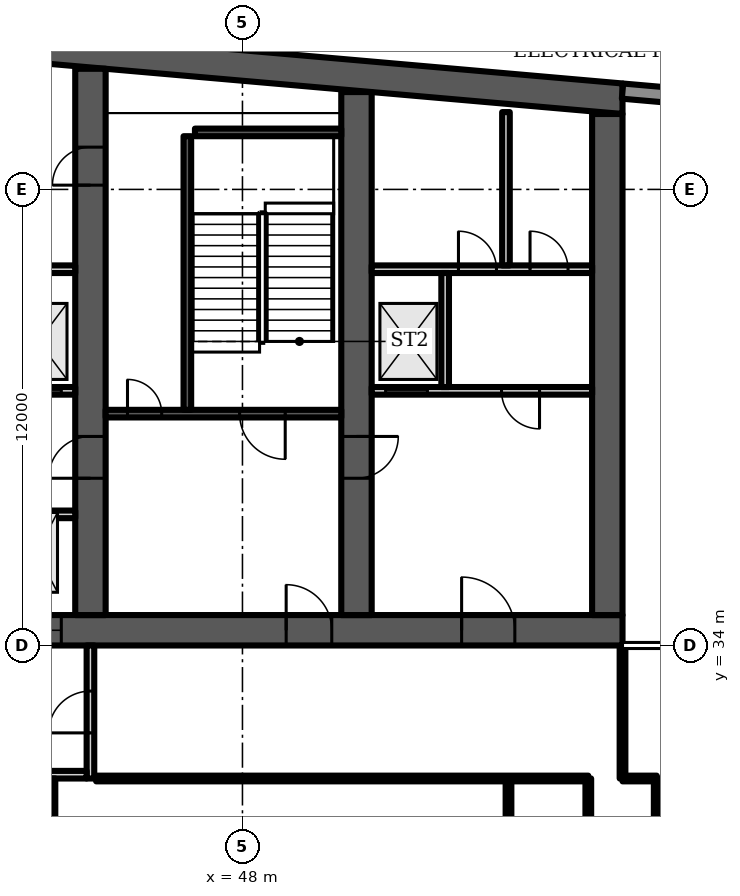
"""IFC4 building model, lengths in metres.
Left out: names, types, materials, properties, quantities, classifications, styles, units other than length and angle.
Written with IfcOpenShell. Run it as: python <this file> out.ifc"""

import sys

from ifc_helpers import new_model, si_unit, direction, frame, frame_2d, origin, place, context, subcontext, project, spatial, polyline, rectangle, outline, extrude, element, fill, save


model = new_model("IFC4")
c1 = context("Model", 3, precision=1e-05, world=origin(), true_north=direction((0.0, 1.0)))
c2 = subcontext(c1, "Body", "Model", "MODEL_VIEW")
j1 = project(units=[si_unit("LENGTHUNIT", "METRE"), si_unit("PLANEANGLEUNIT", "RADIAN")], contexts=[c1])
p1 = place(None, origin())
s1 = spatial("IfcSite", under=j1, at=p1, CompositionType="ELEMENT")
p2 = place(p1, origin())
s2 = spatial("IfcBuilding", under=s1, at=p2, CompositionType="ELEMENT")
p3 = place(p2, frame((0.0, 0.0, 202.3)))
s3 = spatial("IfcBuildingStorey", under=s2, at=p3, CompositionType="ELEMENT", Elevation=202.3)
p4 = place(p3, origin())
e1 = element("IfcWall", 1, at=p4, inside=s3, PredefinedType="SHEAR", context=c2, shape_type="SweptSolid", body=[
    extrude(outline(polyline([(16.0, 47.984), (37.0, 49.822), (58.0, 47.984), (58.0, 48.787), (37.0, 50.625), (16.0, 48.787), (16.0, 47.984)])), origin(), (0.0, 0.0, 1.0), 4.8),
])
p5 = place(p3, frame((16.0, 34.4, 0.0), z_axis=(0.0, 0.0, 1.0), x_axis=(1.0, 0.0, 0.0)))
e2 = element("IfcWall", 2, at=p5, inside=s3, PredefinedType="SHEAR", context=c2, shape_type="SweptSolid", body=[
    extrude(rectangle(XDim=42.0, YDim=0.8, at=frame_2d((21.0, 0.0))), origin(), (0.0, 0.0, 1.0), 4.8),
])
p6 = place(p5, frame((3.2, 0.0, 0.0)))
e3 = element("IfcOpeningElement", 3, at=p6, cuts=e2, PredefinedType="OPENING", context=c2, shape_type="SweptSolid", body=[
    extrude(rectangle(XDim=1.0, YDim=2.1, at=frame_2d((0.5, 1.05))), frame((0.0, 0.41, 0.0), z_axis=(0.0, -1.0, 0.0), x_axis=(1.0, 0.0, 0.0)), (0.0, 0.0, 1.0), 0.82),
])
p7 = place(p5, frame((7.65, 0.0, 0.0)))
e4 = element("IfcOpeningElement", 4, at=p7, cuts=e2, PredefinedType="OPENING", context=c2, shape_type="SweptSolid", body=[
    extrude(rectangle(XDim=1.2, YDim=2.1, at=frame_2d((0.6, 1.05))), frame((0.0, 0.41, 0.0), z_axis=(0.0, -1.0, 0.0), x_axis=(1.0, 0.0, 0.0)), (0.0, 0.0, 1.0), 0.82),
])
p8 = place(p5, frame((14.767, 0.0, 0.0)))
e5 = element("IfcOpeningElement", 5, at=p8, cuts=e2, PredefinedType="OPENING", context=c2, shape_type="SweptSolid", body=[
    extrude(rectangle(XDim=1.1, YDim=2.1, at=frame_2d((0.55, 1.05))), frame((0.0, 0.41, 0.0), z_axis=(0.0, -1.0, 0.0), x_axis=(1.0, 0.0, 0.0)), (0.0, 0.0, 1.0), 0.82),
])
p9 = place(p5, frame((19.133, 0.0, 0.0)))
e6 = element("IfcOpeningElement", 6, at=p9, cuts=e2, PredefinedType="OPENING", context=c2, shape_type="SweptSolid", body=[
    extrude(rectangle(XDim=1.1, YDim=2.1, at=frame_2d((0.55, 1.05))), frame((0.0, 0.41, 0.0), z_axis=(0.0, -1.0, 0.0), x_axis=(1.0, 0.0, 0.0)), (0.0, 0.0, 1.0), 0.82),
])
p10 = place(p5, frame((16.8, 0.0, 0.0)))
e7 = element("IfcOpeningElement", 7, at=p10, cuts=e2, PredefinedType="OPENING", context=c2, shape_type="SweptSolid", body=[
    extrude(rectangle(XDim=1.4, YDim=2.1, at=frame_2d((0.7, 1.05))), frame((0.0, 0.41, 0.0), z_axis=(0.0, -1.0, 0.0), x_axis=(1.0, 0.0, 0.0)), (0.0, 0.0, 1.0), 0.82),
])
p11 = place(p5, frame((21.767, 0.0, 0.0)))
e8 = element("IfcOpeningElement", 8, at=p11, cuts=e2, PredefinedType="OPENING", context=c2, shape_type="SweptSolid", body=[
    extrude(rectangle(XDim=1.1, YDim=2.1, at=frame_2d((0.55, 1.05))), frame((0.0, 0.41, 0.0), z_axis=(0.0, -1.0, 0.0), x_axis=(1.0, 0.0, 0.0)), (0.0, 0.0, 1.0), 0.82),
])
p12 = place(p5, frame((23.95, 0.0, 0.0)))
e9 = element("IfcOpeningElement", 9, at=p12, cuts=e2, PredefinedType="OPENING", context=c2, shape_type="SweptSolid", body=[
    extrude(rectangle(XDim=1.1, YDim=2.1, at=frame_2d((0.55, 1.05))), frame((0.0, 0.41, 0.0), z_axis=(0.0, -1.0, 0.0), x_axis=(1.0, 0.0, 0.0)), (0.0, 0.0, 1.0), 0.82),
])
p13 = place(p5, frame((26.133, 0.0, 0.0)))
e10 = element("IfcOpeningElement", 10, at=p13, cuts=e2, PredefinedType="OPENING", context=c2, shape_type="SweptSolid", body=[
    extrude(rectangle(XDim=1.1, YDim=2.1, at=frame_2d((0.55, 1.05))), frame((0.0, 0.41, 0.0), z_axis=(0.0, -1.0, 0.0), x_axis=(1.0, 0.0, 0.0)), (0.0, 0.0, 1.0), 0.82),
])
p14 = place(p5, frame((33.15, 0.0, 0.0)))
e11 = element("IfcOpeningElement", 11, at=p14, cuts=e2, PredefinedType="OPENING", context=c2, shape_type="SweptSolid", body=[
    extrude(rectangle(XDim=1.2, YDim=2.1, at=frame_2d((0.6, 1.05))), frame((0.0, 0.41, 0.0), z_axis=(0.0, -1.0, 0.0), x_axis=(1.0, 0.0, 0.0)), (0.0, 0.0, 1.0), 0.82),
])
p15 = place(p5, frame((37.767, 0.0, 0.0)))
e12 = element("IfcOpeningElement", 12, at=p15, cuts=e2, PredefinedType="OPENING", context=c2, shape_type="SweptSolid", body=[
    extrude(rectangle(XDim=1.4, YDim=2.1, at=frame_2d((0.7, 1.05))), frame((0.0, 0.41, 0.0), z_axis=(0.0, -1.0, 0.0), x_axis=(1.0, 0.0, 0.0)), (0.0, 0.0, 1.0), 0.82),
])
p16 = place(p3, frame((44.0, 34.8, 0.0), z_axis=(0.0, 0.0, 1.0), x_axis=(0.0, 1.0, 0.0)))
e13 = element("IfcWall", 13, at=p16, inside=s3, PredefinedType="SHEAR", context=c2, shape_type="SweptSolid", body=[
    extrude(rectangle(XDim=14.374, YDim=0.8, at=frame_2d((7.187, 0.0))), origin(), (0.0, 0.0, 1.0), 4.8),
])
p17 = place(p16, frame((11.312, 0.0, 0.0)))
e14 = element("IfcOpeningElement", 14, at=p17, cuts=e13, PredefinedType="OPENING", context=c2, shape_type="SweptSolid", body=[
    extrude(rectangle(XDim=1.0, YDim=2.1, at=frame_2d((0.5, 1.05))), frame((0.0, 0.41, 0.0), z_axis=(0.0, -1.0, 0.0), x_axis=(1.0, 0.0, 0.0)), (0.0, 0.0, 1.0), 0.82),
])
p18 = place(p16, frame((3.6, 0.0, 0.0)))
e15 = element("IfcOpeningElement", 15, at=p18, cuts=e13, PredefinedType="OPENING", context=c2, shape_type="SweptSolid", body=[
    extrude(rectangle(XDim=1.1, YDim=2.1, at=frame_2d((0.55, 1.05))), frame((0.0, 0.41, 0.0), z_axis=(0.0, -1.0, 0.0), x_axis=(1.0, 0.0, 0.0)), (0.0, 0.0, 1.0), 0.82),
])
p19 = place(p3, frame((51.0, 34.8, 0.0), z_axis=(0.0, 0.0, 1.0), x_axis=(0.0, 1.0, 0.0)))
e16 = element("IfcWall", 16, at=p19, inside=s3, PredefinedType="SHEAR", context=c2, shape_type="SweptSolid", body=[
    extrude(rectangle(XDim=13.762, YDim=0.8, at=frame_2d((6.881, 0.0))), origin(), (0.0, 0.0, 1.0), 4.8),
])
p20 = place(p19, frame((3.6, 0.0, 0.0)))
e17 = element("IfcOpeningElement", 17, at=p20, cuts=e16, PredefinedType="OPENING", context=c2, shape_type="SweptSolid", body=[
    extrude(rectangle(XDim=1.1, YDim=2.1, at=frame_2d((0.55, 1.05))), frame((0.0, 0.41, 0.0), z_axis=(0.0, -1.0, 0.0), x_axis=(1.0, 0.0, 0.0)), (0.0, 0.0, 1.0), 0.82),
])
p21 = place(p3, frame((57.6, 34.8, 0.0), z_axis=(0.0, 0.0, 1.0), x_axis=(0.0, 1.0, 0.0)))
e18 = element("IfcWall", 18, at=p21, inside=s3, PredefinedType="SHEAR", context=c2, shape_type="SweptSolid", body=[
    extrude(rectangle(XDim=13.184, YDim=0.8, at=frame_2d((6.592, 0.0))), origin(), (0.0, 0.0, 1.0), 4.8),
])
p22 = place(p3, frame((60.983, 48.326, 0.0), z_axis=(0.0, 0.0, 1.0), x_axis=(-0.996194, 0.087168, 0.0)))
e19 = element("IfcWall", 19, at=p22, inside=s3, PredefinedType="SOLIDWALL", context=c2, shape_type="SweptSolid", body=[
    extrude(rectangle(XDim=2.994, YDim=0.4, at=frame_2d((1.497, 0.0))), origin(), (0.0, 0.0, 1.0), 4.4),
])
p23 = place(p3, frame((37.4, 40.7, 0.0), z_axis=(0.0, 0.0, 1.0), x_axis=(1.0, 0.0, 0.0)))
e20 = element("IfcWall", 20, at=p23, inside=s3, PredefinedType="PARTITIONING", context=c2, shape_type="SweptSolid", body=[
    extrude(rectangle(XDim=6.2, YDim=0.2, at=frame_2d((3.1, 0.0))), origin(), (0.0, 0.0, 1.0), 4.4),
])
p24 = place(p23, frame((0.367, 0.0, 0.0)))
e21 = element("IfcOpeningElement", 21, at=p24, cuts=e20, PredefinedType="OPENING", context=c2, shape_type="SweptSolid", body=[
    extrude(rectangle(XDim=1.1, YDim=2.1, at=frame_2d((0.55, 1.05))), frame((0.0, 0.11, 0.0), z_axis=(0.0, -1.0, 0.0), x_axis=(1.0, 0.0, 0.0)), (0.0, 0.0, 1.0), 0.22),
])
p25 = place(p23, frame((2.55, 0.0, 0.0)))
e22 = element("IfcOpeningElement", 22, at=p25, cuts=e20, PredefinedType="OPENING", context=c2, shape_type="SweptSolid", body=[
    extrude(rectangle(XDim=1.1, YDim=2.1, at=frame_2d((0.55, 1.05))), frame((0.0, 0.11, 0.0), z_axis=(0.0, -1.0, 0.0), x_axis=(1.0, 0.0, 0.0)), (0.0, 0.0, 1.0), 0.22),
])
p26 = place(p23, frame((4.733, 0.0, 0.0)))
e23 = element("IfcOpeningElement", 23, at=p26, cuts=e20, PredefinedType="OPENING", context=c2, shape_type="SweptSolid", body=[
    extrude(rectangle(XDim=1.1, YDim=2.1, at=frame_2d((0.55, 1.05))), frame((0.0, 0.11, 0.0), z_axis=(0.0, -1.0, 0.0), x_axis=(1.0, 0.0, 0.0)), (0.0, 0.0, 1.0), 0.22),
])
p27 = place(p3, frame((0.0, 0.0, -0.0)))
e24 = element("IfcWall", 24, at=p27, inside=s3, PredefinedType="PARTITIONING", context=c2, shape_type="SweptSolid", body=[
    extrude(outline(polyline([(41.567, 37.1), (39.433, 37.1), (39.433, 34.8), (39.233, 34.8), (39.233, 37.65), (37.4, 37.65), (37.4, 37.85), (39.233, 37.85), (39.433, 37.85), (39.433, 37.3), (41.567, 37.3), (41.567, 37.55), (41.767, 37.55), (43.6, 37.55), (43.6, 37.35), (41.767, 37.35), (41.767, 34.8), (41.567, 34.8), (41.567, 37.1)])), origin(), (0.0, 0.0, 1.0), 4.4),
])
p28 = place(p3, frame((0.0, 0.0, -0.0)))
e25 = element("IfcWall", 25, at=p28, inside=s3, PredefinedType="PARTITIONING", context=c2, shape_type="SweptSolid", body=[
    extrude(outline(polyline([(39.433, 40.8), (39.233, 40.8), (39.233, 43.8), (37.4, 43.8), (37.4, 44.0), (43.6, 44.0), (43.6, 43.8), (41.767, 43.8), (41.767, 40.8), (41.567, 40.8), (41.567, 43.8), (39.433, 43.8), (39.433, 40.8)])), origin(), (0.0, 0.0, 1.0), 4.4),
])
p29 = place(p3, frame((44.4, 40.1, 0.0), z_axis=(0.0, 0.0, 1.0), x_axis=(1.0, 0.0, 0.0)))
e26 = element("IfcWall", 26, at=p29, inside=s3, PredefinedType="SHEAR", context=c2, shape_type="SweptSolid", body=[
    extrude(rectangle(XDim=6.2, YDim=0.2, at=frame_2d((3.1, 0.0))), origin(), (0.0, 0.0, 1.0), 4.4),
])
p30 = place(p29, frame((3.525, 0.0, 0.0)))
e27 = element("IfcOpeningElement", 27, at=p30, cuts=e26, PredefinedType="OPENING", context=c2, shape_type="SweptSolid", body=[
    extrude(rectangle(XDim=1.2, YDim=2.1, at=frame_2d((0.6, 1.05))), frame((0.0, 0.11, 0.0), z_axis=(0.0, -1.0, 0.0), x_axis=(1.0, 0.0, 0.0)), (0.0, 0.0, 1.0), 0.22),
])
p31 = place(p29, frame((0.575, 0.0, 0.0)))
e28 = element("IfcOpeningElement", 28, at=p31, cuts=e26, PredefinedType="OPENING", context=c2, shape_type="SweptSolid", body=[
    extrude(rectangle(XDim=0.9, YDim=2.1, at=frame_2d((0.45, 1.05))), frame((0.0, 0.11, 0.0), z_axis=(0.0, -1.0, 0.0), x_axis=(1.0, 0.0, 0.0)), (0.0, 0.0, 1.0), 0.22),
])
p32 = place(p3, frame((46.55, 40.2, 0.0), z_axis=(0.0, 0.0, 1.0), x_axis=(0.0, 1.0, 0.0)))
e29 = element("IfcWall", 29, at=p32, inside=s3, PredefinedType="SHEAR", context=c2, shape_type="SweptSolid", body=[
    extrude(rectangle(XDim=7.2, YDim=0.2, at=frame_2d((3.6, 0.0))), origin(), (0.0, 0.0, 1.0), 4.4),
])
p33 = place(p3, frame((46.75, 47.5, 0.0), z_axis=(0.0, 0.0, 1.0), x_axis=(1.0, 0.0, 0.0)))
e30 = element("IfcWall", 30, at=p33, inside=s3, PredefinedType="SHEAR", context=c2, shape_type="SweptSolid", body=[
    extrude(rectangle(XDim=3.85, YDim=0.2, at=frame_2d((1.925, 0.0))), origin(), (0.0, 0.0, 1.0), 4.4),
])
p34 = place(p3, frame((51.4, 40.7, 0.0), z_axis=(0.0, 0.0, 1.0), x_axis=(1.0, 0.0, 0.0)))
e31 = element("IfcWall", 31, at=p34, inside=s3, PredefinedType="PARTITIONING", context=c2, shape_type="SweptSolid", body=[
    extrude(rectangle(XDim=5.8, YDim=0.2, at=frame_2d((2.9, 0.0))), origin(), (0.0, 0.0, 1.0), 4.4),
])
p35 = place(p34, frame((0.367, 0.0, 0.0)))
e32 = element("IfcOpeningElement", 32, at=p35, cuts=e31, PredefinedType="OPENING", context=c2, shape_type="SweptSolid", body=[
    extrude(rectangle(XDim=1.1, YDim=2.1, at=frame_2d((0.55, 1.05))), frame((0.0, 0.11, 0.0), z_axis=(0.0, -1.0, 0.0), x_axis=(1.0, 0.0, 0.0)), (0.0, 0.0, 1.0), 0.22),
])
p36 = place(p34, frame((3.417, 0.0, 0.0)))
e33 = element("IfcOpeningElement", 33, at=p36, cuts=e31, PredefinedType="OPENING", context=c2, shape_type="SweptSolid", body=[
    extrude(rectangle(XDim=1.0, YDim=2.1, at=frame_2d((0.5, 1.05))), frame((0.0, 0.11, 0.0), z_axis=(0.0, -1.0, 0.0), x_axis=(1.0, 0.0, 0.0)), (0.0, 0.0, 1.0), 0.22),
])
p37 = place(p3, frame((51.4, 43.9, 0.0), z_axis=(0.0, 0.0, 1.0), x_axis=(1.0, 0.0, 0.0)))
e34 = element("IfcWall", 34, at=p37, inside=s3, PredefinedType="PARTITIONING", context=c2, shape_type="SweptSolid", body=[
    extrude(rectangle(XDim=5.8, YDim=0.2, at=frame_2d((2.9, 0.0))), origin(), (0.0, 0.0, 1.0), 4.4),
])
p38 = place(p37, frame((2.283, 0.0, 0.0)))
e35 = element("IfcOpeningElement", 35, at=p38, cuts=e34, PredefinedType="OPENING", context=c2, shape_type="SweptSolid", body=[
    extrude(rectangle(XDim=1.0, YDim=2.1, at=frame_2d((0.5, 1.05))), frame((0.0, 0.11, 0.0), z_axis=(0.0, -1.0, 0.0), x_axis=(1.0, 0.0, 0.0)), (0.0, 0.0, 1.0), 0.22),
])
p39 = place(p37, frame((4.167, 0.0, 0.0)))
e36 = element("IfcOpeningElement", 36, at=p39, cuts=e34, PredefinedType="OPENING", context=c2, shape_type="SweptSolid", body=[
    extrude(rectangle(XDim=1.0, YDim=2.1, at=frame_2d((0.5, 1.05))), frame((0.0, 0.11, 0.0), z_axis=(0.0, -1.0, 0.0), x_axis=(1.0, 0.0, 0.0)), (0.0, 0.0, 1.0), 0.22),
])
p40 = place(p3, frame((0.0, 0.0, -0.0)))
e37 = element("IfcWall", 37, at=p40, inside=s3, PredefinedType="PARTITIONING", context=c2, shape_type="SweptSolid", body=[
    extrude(outline(polyline([(53.433, 40.8), (53.433, 43.8), (53.233, 43.8), (53.233, 40.8), (53.433, 40.8)])), origin(), (0.0, 0.0, 1.0), 4.4),
])
p41 = place(p3, frame((54.933, 44.0, 0.0), z_axis=(0.0, 0.0, 1.0), x_axis=(0.0, 1.0, 0.0)))
e38 = element("IfcWall", 38, at=p41, inside=s3, PredefinedType="PARTITIONING", context=c2, shape_type="SweptSolid", body=[
    extrude(rectangle(XDim=4.034, YDim=0.2, at=frame_2d((2.017, 0.0))), origin(), (0.0, 0.0, 1.0), 4.4),
])
p42 = place(p3, frame((44.0, 30.5, 0.0), z_axis=(0.0, 0.0, 1.0), x_axis=(0.0, 1.0, 0.0)))
e39 = element("IfcWall", 39, at=p42, inside=s3, PredefinedType="PARTITIONING", context=c2, shape_type="SweptSolid", body=[
    extrude(rectangle(XDim=3.5, YDim=0.2, at=frame_2d((1.75, 0.0))), origin(), (0.0, 0.0, 1.0), 4.4),
])
p43 = place(p42, frame((1.2, 0.0, 0.0)))
e40 = element("IfcOpeningElement", 40, at=p43, cuts=e39, PredefinedType="OPENING", context=c2, shape_type="SweptSolid", body=[
    extrude(rectangle(XDim=1.1, YDim=2.1, at=frame_2d((0.55, 1.05))), frame((0.0, 0.11, 0.0), z_axis=(0.0, -1.0, 0.0), x_axis=(1.0, 0.0, 0.0)), (0.0, 0.0, 1.0), 0.22),
])
p44 = place(p3, frame((41.1, 30.6, 0.0), z_axis=(0.0, 0.0, 1.0), x_axis=(1.0, 0.0, 0.0)))
e41 = element("IfcWall", 41, at=p44, inside=s3, PredefinedType="PARTITIONING", context=c2, shape_type="SweptSolid", body=[
    extrude(rectangle(XDim=2.8, YDim=0.2, at=frame_2d((1.4, 0.0))), origin(), (0.0, 0.0, 1.0), 4.4),
])
for number, where, z_axis, x_axis in (
    (42, (43.0, 16.145, 0.0), (0.0, 0.0, 1.0), (0.0, 1.0, 0.0)),
    (43, (55.0, 16.145, 0.0), (0.0, 0.0, 1.0), (0.0, 1.0, 0.0)),
):
    element("IfcWall", number, at=place(p3, frame(where, z_axis=z_axis, x_axis=x_axis)), inside=s3, PredefinedType="PARTITIONING", context=c2, shape_type="SweptSolid", body=[
        extrude(rectangle(XDim=14.355, YDim=0.15, at=frame_2d((7.177, 0.0))), origin(), (0.0, 0.0, 1.0), 4.4),
    ])
p45 = place(p3, frame((57.1, 23.95, 0.0), z_axis=(0.0, 0.0, 1.0), x_axis=(0.0, 1.0, 0.0)))
e44 = element("IfcWall", 44, at=p45, inside=s3, PredefinedType="PARTITIONING", context=c2, shape_type="SweptSolid", body=[
    extrude(rectangle(XDim=6.55, YDim=0.15, at=frame_2d((3.275, 0.0))), origin(), (0.0, 0.0, 1.0), 4.4),
])
p46 = place(p3, frame((58.0, 30.5, 0.0), z_axis=(0.0, 0.0, 1.0), x_axis=(0.0, 1.0, 0.0)))
e45 = element("IfcWall", 45, at=p46, inside=s3, PredefinedType="PARTITIONING", context=c2, shape_type="SweptSolid", body=[
    extrude(rectangle(XDim=3.48, YDim=0.15, at=frame_2d((1.74, 0.0))), origin(), (0.0, 0.0, 1.0), 4.4),
])
p47 = place(p3, frame((58.0, 30.5, 0.0), z_axis=(0.0, 0.0, 1.0), x_axis=(1.0, 0.0, 0.0)))
e46 = element("IfcWall", 46, at=p47, inside=s3, PredefinedType="PARTITIONING", context=c2, shape_type="SweptSolid", body=[
    extrude(rectangle(XDim=0.9, YDim=0.15, at=frame_2d((0.45, 0.0))), origin(), (0.0, 0.0, 1.0), 4.4),
])
p48 = place(p3, frame((58.9, 25.75, 0.0), z_axis=(0.0, 0.0, 1.0), x_axis=(0.0, 1.0, 0.0)))
e47 = element("IfcWall", 47, at=p48, inside=s3, PredefinedType="PARTITIONING", context=c2, shape_type="SweptSolid", body=[
    extrude(rectangle(XDim=4.75, YDim=0.15, at=frame_2d((2.375, 0.0))), origin(), (0.0, 0.0, 1.0), 4.4),
])
p49 = place(p3, frame((44.15, 30.5, 0.0), z_axis=(0.0, 0.0, 1.0), x_axis=(1.0, 0.0, 0.0)))
e48 = element("IfcWall", 48, at=p49, inside=s3, PredefinedType="PARTITIONING", context=c2, shape_type="SweptSolid", body=[
    extrude(rectangle(XDim=12.95, YDim=0.15, at=frame_2d((6.475, 0.0))), origin(), (0.0, 0.0, 1.0), 4.4),
])
p50 = place(p13, origin())
e49 = element("IfcDoor", 49, at=p50, inside=s3, OperationType="DOUBLE_DOOR_SLIDING", PredefinedType="DOOR", context=c2, shape_type="SweptSolid", body=[
    extrude(rectangle(XDim=1.1, YDim=2.1, at=frame_2d((0.55, 1.05))), frame((0.0, 0.025, 0.0), z_axis=(0.0, -1.0, 0.0), x_axis=(1.0, 0.0, 0.0)), (0.0, 0.0, 1.0), 0.05),
])
fill(e10, e49)
p51 = place(p26, origin())
e50 = element("IfcDoor", 50, at=p51, inside=s3, OperationType="DOUBLE_DOOR_SLIDING", PredefinedType="DOOR", context=c2, shape_type="SweptSolid", body=[
    extrude(rectangle(XDim=1.1, YDim=2.1, at=frame_2d((0.55, 1.05))), frame((0.0, 0.025, 0.0), z_axis=(0.0, -1.0, 0.0), x_axis=(1.0, 0.0, 0.0)), (0.0, 0.0, 1.0), 0.05),
])
fill(e23, e50)
p52 = place(p17, origin())
e51 = element("IfcDoor", 51, at=p52, inside=s3, OperationType="SINGLE_SWING_LEFT", PredefinedType="DOOR", context=c2, shape_type="SweptSolid", body=[
    extrude(rectangle(XDim=1.0, YDim=2.1, at=frame_2d((0.5, 1.05))), frame((0.0, 0.4, 0.0), z_axis=(0.0, -1.0, 0.0), x_axis=(1.0, 0.0, 0.0)), (0.0, 0.0, 1.0), 0.8),
])
fill(e14, e51)
p53 = place(p30, origin())
e52 = element("IfcDoor", 52, at=p53, inside=s3, OperationType="SINGLE_SWING_RIGHT", PredefinedType="DOOR", context=c2, shape_type="SweptSolid", body=[
    extrude(rectangle(XDim=1.2, YDim=2.1, at=frame_2d((0.6, 1.05))), frame((0.0, 0.025, 0.0), z_axis=(0.0, -1.0, 0.0), x_axis=(1.0, 0.0, 0.0)), (0.0, 0.0, 1.0), 0.05),
])
fill(e27, e52)
p54 = place(p31, origin())
e53 = element("IfcDoor", 53, at=p54, inside=s3, OperationType="SINGLE_SWING_LEFT", PredefinedType="DOOR", context=c2, shape_type="SweptSolid", body=[
    extrude(rectangle(XDim=0.9, YDim=2.1, at=frame_2d((0.45, 1.05))), frame((0.0, 0.025, 0.0), z_axis=(0.0, -1.0, 0.0), x_axis=(1.0, 0.0, 0.0)), (0.0, 0.0, 1.0), 0.05),
])
fill(e28, e53)
p55 = place(p14, origin())
e54 = element("IfcDoor", 54, at=p55, inside=s3, OperationType="SINGLE_SWING_LEFT", PredefinedType="DOOR", context=c2, shape_type="SweptSolid", body=[
    extrude(rectangle(XDim=1.2, YDim=2.1, at=frame_2d((0.6, 1.05))), frame((0.0, 0.025, 0.0), z_axis=(0.0, -1.0, 0.0), x_axis=(1.0, 0.0, 0.0)), (0.0, 0.0, 1.0), 0.05),
])
fill(e11, e54)
p56 = place(p15, origin())
e55 = element("IfcDoor", 55, at=p56, inside=s3, OperationType="DOUBLE_DOOR_SINGLE_SWING", PredefinedType="DOOR", context=c2, shape_type="SweptSolid", body=[
    extrude(rectangle(XDim=1.4, YDim=2.1, at=frame_2d((0.7, 1.05))), frame((0.0, 0.025, 0.0), z_axis=(0.0, -1.0, 0.0), x_axis=(1.0, 0.0, 0.0)), (0.0, 0.0, 1.0), 0.05),
])
fill(e12, e55)
p57 = place(p35, origin())
e56 = element("IfcDoor", 56, at=p57, inside=s3, OperationType="DOUBLE_DOOR_SLIDING", PredefinedType="DOOR", context=c2, shape_type="SweptSolid", body=[
    extrude(rectangle(XDim=1.1, YDim=2.1, at=frame_2d((0.55, 1.05))), frame((0.0, 0.025, 0.0), z_axis=(0.0, -1.0, 0.0), x_axis=(1.0, 0.0, 0.0)), (0.0, 0.0, 1.0), 0.05),
])
fill(e32, e56)
p58 = place(p36, origin())
e57 = element("IfcDoor", 57, at=p58, inside=s3, OperationType="SINGLE_SWING_RIGHT", PredefinedType="DOOR", context=c2, shape_type="SweptSolid", body=[
    extrude(rectangle(XDim=1.0, YDim=2.1, at=frame_2d((0.5, 1.05))), frame((0.0, 0.025, 0.0), z_axis=(0.0, -1.0, 0.0), x_axis=(1.0, 0.0, 0.0)), (0.0, 0.0, 1.0), 0.05),
])
fill(e33, e57)
p59 = place(p38, origin())
e58 = element("IfcDoor", 58, at=p59, inside=s3, OperationType="SINGLE_SWING_LEFT", PredefinedType="DOOR", context=c2, shape_type="SweptSolid", body=[
    extrude(rectangle(XDim=1.0, YDim=2.1, at=frame_2d((0.5, 1.05))), frame((0.0, 0.025, 0.0), z_axis=(0.0, -1.0, 0.0), x_axis=(1.0, 0.0, 0.0)), (0.0, 0.0, 1.0), 0.05),
])
fill(e35, e58)
p60 = place(p39, origin())
e59 = element("IfcDoor", 59, at=p60, inside=s3, OperationType="SINGLE_SWING_LEFT", PredefinedType="DOOR", context=c2, shape_type="SweptSolid", body=[
    extrude(rectangle(XDim=1.0, YDim=2.1, at=frame_2d((0.5, 1.05))), frame((0.0, 0.025, 0.0), z_axis=(0.0, -1.0, 0.0), x_axis=(1.0, 0.0, 0.0)), (0.0, 0.0, 1.0), 0.05),
])
fill(e36, e59)
p61 = place(p18, origin())
e60 = element("IfcDoor", 60, at=p61, inside=s3, OperationType="SINGLE_SWING_LEFT", PredefinedType="DOOR", context=c2, shape_type="SweptSolid", body=[
    extrude(rectangle(XDim=1.1, YDim=2.1, at=frame_2d((0.55, 1.05))), frame((0.0, 0.025, 0.0), z_axis=(0.0, -1.0, 0.0), x_axis=(1.0, 0.0, 0.0)), (0.0, 0.0, 1.0), 0.05),
])
fill(e15, e60)
p62 = place(p20, origin())
e61 = element("IfcDoor", 61, at=p62, inside=s3, OperationType="SINGLE_SWING_RIGHT", PredefinedType="DOOR", context=c2, shape_type="SweptSolid", body=[
    extrude(rectangle(XDim=1.1, YDim=2.1, at=frame_2d((0.55, 1.05))), frame((0.0, 0.025, 0.0), z_axis=(0.0, -1.0, 0.0), x_axis=(1.0, 0.0, 0.0)), (0.0, 0.0, 1.0), 0.05),
])
fill(e17, e61)
p63 = place(p43, origin())
e62 = element("IfcDoor", 62, at=p63, inside=s3, OperationType="SINGLE_SWING_LEFT", PredefinedType="DOOR", context=c2, shape_type="SweptSolid", body=[
    extrude(rectangle(XDim=1.1, YDim=2.1, at=frame_2d((0.55, 1.05))), frame((0.0, 0.025, 0.0), z_axis=(0.0, -1.0, 0.0), x_axis=(1.0, 0.0, 0.0)), (0.0, 0.0, 1.0), 0.05),
])
fill(e40, e62)
save(model, sys.argv[1])
